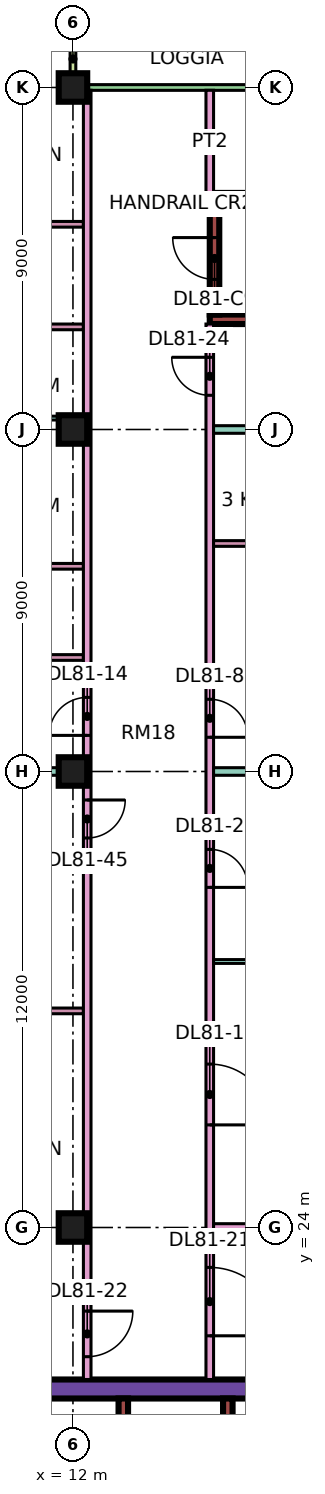
"""IFC4 building model, lengths in metres.
Left out: names, types, materials, properties, quantities, classifications, styles, units other than length and angle.
Written with IfcOpenShell. Run it as: python <this file> out.ifc"""

import sys

from ifc_helpers import new_model, si_unit, direction, frame, frame_2d, origin, origin_2d, place, context, subcontext, project, spatial, rectangle, extrude, element, fill, save


model = new_model("IFC4")
c1 = context("Model", 3, precision=1e-05, world=origin(), true_north=direction((0.0, 1.0)))
c2 = subcontext(c1, "Body", "Model", "MODEL_VIEW")
j1 = project(units=[si_unit("LENGTHUNIT", "METRE"), si_unit("PLANEANGLEUNIT", "RADIAN")], contexts=[c1])
p1 = place(None, origin())
s1 = spatial("IfcSite", under=j1, at=p1, CompositionType="ELEMENT")
p2 = place(p1, origin())
s2 = spatial("IfcBuilding", under=s1, at=p2, CompositionType="ELEMENT")
p3 = place(p2, frame((0.0, 0.0, 350.15)))
s3 = spatial("IfcBuildingStorey", under=s2, at=p3, CompositionType="ELEMENT", Elevation=350.15)
for number, where, z_axis, x_axis in (
    (1, (12.0, 24.0, 0.0), (0.0, 0.0, 1.0), (1.0, 0.0, 0.0)),
    (2, (12.0, 36.0, 0.0), (0.0, 0.0, 1.0), (1.0, 0.0, 0.0)),
    (3, (12.0, 45.0, 0.0), (0.0, 0.0, 1.0), (1.0, 0.0, 0.0)),
    (4, (12.0, 54.0, 0.0), (0.0, 0.0, 1.0), (1.0, 0.0, 0.0)),
):
    element("IfcColumn", number, at=place(p3, frame(where, z_axis=z_axis, x_axis=x_axis)), inside=s3, PredefinedType="COLUMN", context=c2, shape_type="SweptSolid", body=[
        extrude(rectangle(XDim=0.75, YDim=0.75, at=origin_2d()), origin(), (0.0, 0.0, 1.0), 3.75),
    ])
p4 = place(p3, frame((9.0, 19.75, 0.0), z_axis=(0.0, 0.0, 1.0), x_axis=(1.0, 0.0, 0.0)))
e5 = element("IfcWall", 5, at=p4, inside=s3, PredefinedType="SHEAR", context=c2, shape_type="SweptSolid", body=[
    extrude(rectangle(XDim=25.0, YDim=0.5, at=frame_2d((12.5, 0.0))), origin(), (0.0, 0.0, 1.0), 3.75),
])
p5 = place(p4, frame((19.1, 0.0, 0.0)))
e6 = element("IfcOpeningElement", 6, at=p5, cuts=e5, PredefinedType="OPENING", context=c2, shape_type="SweptSolid", body=[
    extrude(rectangle(XDim=1.8, YDim=2.4, at=frame_2d((0.9, 1.2))), frame((0.0, 0.26, 0.0), z_axis=(0.0, -1.0, 0.0), x_axis=(1.0, 0.0, 0.0)), (0.0, 0.0, 1.0), 0.52),
])
p6 = place(p3, frame((13.325, 7.5, 0.0), z_axis=(0.0, 0.0, 1.0), x_axis=(0.0, 1.0, 0.0)))
e7 = element("IfcWall", 7, at=p6, inside=s3, PredefinedType="SHEAR", context=c2, shape_type="SweptSolid", body=[
    extrude(rectangle(XDim=12.0, YDim=0.25, at=frame_2d((6.0, 0.0))), origin(), (0.0, 0.0, 1.0), 3.75),
])
p7 = place(p3, frame((16.075, 15.8, 0.0), z_axis=(0.0, 0.0, 1.0), x_axis=(0.0, 1.0, 0.0)))
e8 = element("IfcWall", 8, at=p7, inside=s3, PredefinedType="SHEAR", context=c2, shape_type="SweptSolid", body=[
    extrude(rectangle(XDim=3.7, YDim=0.25, at=frame_2d((1.85, 0.0))), origin(), (0.0, 0.0, 1.0), 3.75),
])
for number, where, z_axis, x_axis in (
    (9, (15.6, 47.9, 0.0), (0.0, 0.0, 1.0), (1.0, 0.0, 0.0)),
    (10, (15.6, 51.1, 0.0), (0.0, 0.0, 1.0), (1.0, 0.0, 0.0)),
):
    element("IfcWall", number, at=place(p3, frame(where, z_axis=z_axis, x_axis=x_axis)), inside=s3, PredefinedType="SHEAR", context=c2, shape_type="SweptSolid", body=[
        extrude(rectangle(XDim=7.0, YDim=0.25, at=frame_2d((3.5, 0.0))), origin(), (0.0, 0.0, 1.0), 3.75),
    ])
p8 = place(p3, frame((15.725, 48.025, 0.0), z_axis=(0.0, 0.0, 1.0), x_axis=(0.0, 1.0, 0.0)))
e11 = element("IfcWall", 11, at=p8, inside=s3, PredefinedType="SHEAR", context=c2, shape_type="SweptSolid", body=[
    extrude(rectangle(XDim=2.95, YDim=0.25, at=frame_2d((1.475, 0.0))), origin(), (0.0, 0.0, 1.0), 3.75),
])
p9 = place(p8, frame((0.925, 0.0, 0.0)))
e12 = element("IfcOpeningElement", 12, at=p9, cuts=e11, PredefinedType="OPENING", context=c2, shape_type="SweptSolid", body=[
    extrude(rectangle(XDim=1.1, YDim=2.2, at=frame_2d((0.55, 1.1))), frame((0.0, 0.135, 0.0), z_axis=(0.0, -1.0, 0.0), x_axis=(1.0, 0.0, 0.0)), (0.0, 0.0, 1.0), 0.27),
])
p10 = place(p3, frame((22.425, 54.0, 0.0), z_axis=(0.0, 0.0, 1.0), x_axis=(-1.0, 0.0, 0.0)))
e13 = element("IfcWall", 13, at=p10, inside=s3, PredefinedType="SOLIDWALL", context=c2, shape_type="SweptSolid", body=[
    extrude(rectangle(XDim=10.35, YDim=0.15, at=frame_2d((5.175, 0.0))), origin(), (0.0, 0.0, 1.0), 3.35),
])
p11 = place(p10, frame((1.012, 0.0, 0.45)))
e14 = element("IfcOpeningElement", 14, at=p11, cuts=e13, PredefinedType="OPENING", context=c2, shape_type="SweptSolid", body=[
    extrude(rectangle(XDim=4.8, YDim=2.4, at=frame_2d((2.4, 1.2))), frame((0.0, 0.085, 0.0), z_axis=(0.0, -1.0, 0.0), x_axis=(1.0, 0.0, 0.0)), (0.0, 0.0, 1.0), 0.17),
])
p12 = place(p3, frame((12.0, 55.5, 0.0), z_axis=(0.0, 0.0, 1.0), x_axis=(0.0, -1.0, 0.0)))
e15 = element("IfcWall", 15, at=p12, inside=s3, PredefinedType="SOLIDWALL", context=c2, shape_type="SweptSolid", body=[
    extrude(rectangle(XDim=1.5, YDim=0.15, at=frame_2d((0.75, 0.0))), origin(), (0.0, 0.0, 1.0), 3.35),
])
p13 = place(p3, frame((0.0, 36.0, 0.0), z_axis=(0.0, 0.0, 1.0), x_axis=(1.0, 0.0, 0.0)))
e16 = element("IfcWall", 16, at=p13, inside=s3, PredefinedType="PARTITIONING", context=c2, shape_type="SweptSolid", body=[
    extrude(rectangle(XDim=12.275, YDim=0.2, at=frame_2d((6.137, 0.0))), origin(), (0.0, 0.0, 1.0), 3.35),
])
p14 = place(p3, frame((0.074, 22.4, 0.0), z_axis=(0.0, 0.0, 1.0), x_axis=(1.0, 0.0, 0.0)))
e17 = element("IfcWall", 17, at=p14, inside=s3, PredefinedType="PARTITIONING", context=c2, shape_type="SweptSolid", body=[
    extrude(rectangle(XDim=12.201, YDim=0.2, at=frame_2d((6.101, 0.0))), origin(), (0.0, 0.0, 1.0), 3.35),
])
p15 = place(p3, frame((7.05, 29.7, 0.0), z_axis=(0.0, 0.0, 1.0), x_axis=(1.0, 0.0, 0.0)))
e18 = element("IfcWall", 18, at=p15, inside=s3, PredefinedType="PARTITIONING", context=c2, shape_type="SweptSolid", body=[
    extrude(rectangle(XDim=5.225, YDim=0.15, at=frame_2d((2.612, 0.0))), origin(), (0.0, 0.0, 1.0), 3.35),
])
p16 = place(p3, frame((7.05, 33.6, 0.0), z_axis=(0.0, 0.0, 1.0), x_axis=(1.0, 0.0, 0.0)))
e19 = element("IfcWall", 19, at=p16, inside=s3, PredefinedType="PARTITIONING", context=c2, shape_type="SweptSolid", body=[
    extrude(rectangle(XDim=5.225, YDim=0.15, at=frame_2d((2.612, 0.0))), origin(), (0.0, 0.0, 1.0), 3.35),
])
p17 = place(p16, frame((2.175, 0.0, 0.0)))
e20 = element("IfcOpeningElement", 20, at=p17, cuts=e19, PredefinedType="OPENING", context=c2, shape_type="SweptSolid", body=[
    extrude(rectangle(XDim=0.8, YDim=2.1, at=frame_2d((0.4, 1.05))), frame((0.0, 0.085, 0.0), z_axis=(0.0, -1.0, 0.0), x_axis=(1.0, 0.0, 0.0)), (0.0, 0.0, 1.0), 0.17),
])
for number, where, z_axis, x_axis in (
    (21, (7.05, 39.0, 0.0), (0.0, 0.0, 1.0), (1.0, 0.0, 0.0)),
    (22, (7.05, 41.4, 0.0), (0.0, 0.0, 1.0), (1.0, 0.0, 0.0)),
):
    element("IfcWall", number, at=place(p3, frame(where, z_axis=z_axis, x_axis=x_axis)), inside=s3, PredefinedType="PARTITIONING", context=c2, shape_type="SweptSolid", body=[
        extrude(rectangle(XDim=5.225, YDim=0.15, at=frame_2d((2.612, 0.0))), origin(), (0.0, 0.0, 1.0), 3.35),
    ])
p18 = place(p3, frame((7.05, 45.3, 0.0), z_axis=(0.0, 0.0, 1.0), x_axis=(1.0, 0.0, 0.0)))
e23 = element("IfcWall", 23, at=p18, inside=s3, PredefinedType="PARTITIONING", context=c2, shape_type="SweptSolid", body=[
    extrude(rectangle(XDim=5.225, YDim=0.1, at=frame_2d((2.612, 0.0))), origin(), (0.0, 0.0, 1.0), 3.35),
])
for number, where, z_axis, x_axis in (
    (24, (7.05, 47.7, 0.0), (0.0, 0.0, 1.0), (1.0, 0.0, 0.0)),
    (25, (7.05, 50.4, 0.0), (0.0, 0.0, 1.0), (1.0, 0.0, 0.0)),
):
    element("IfcWall", number, at=place(p3, frame(where, z_axis=z_axis, x_axis=x_axis)), inside=s3, PredefinedType="PARTITIONING", context=c2, shape_type="SweptSolid", body=[
        extrude(rectangle(XDim=5.225, YDim=0.15, at=frame_2d((2.612, 0.0))), origin(), (0.0, 0.0, 1.0), 3.35),
    ])
p19 = place(p3, frame((12.375, 20.0, 0.0), z_axis=(0.0, 0.0, 1.0), x_axis=(0.0, 1.0, 0.0)))
e26 = element("IfcWall", 26, at=p19, inside=s3, PredefinedType="PARTITIONING", context=c2, shape_type="SweptSolid", body=[
    extrude(rectangle(XDim=33.926, YDim=0.2, at=frame_2d((16.963, 0.0))), origin(), (0.0, 0.0, 1.0), 3.35),
])
p20 = place(p19, frame((16.95, 0.0, 0.0)))
e27 = element("IfcOpeningElement", 27, at=p20, cuts=e26, PredefinedType="OPENING", context=c2, shape_type="SweptSolid", body=[
    extrude(rectangle(XDim=1.0, YDim=2.1, at=frame_2d((0.5, 1.05))), frame((0.0, 0.11, 0.0), z_axis=(0.0, -1.0, 0.0), x_axis=(1.0, 0.0, 0.0)), (0.0, 0.0, 1.0), 0.22),
])
p21 = place(p19, frame((0.6, 0.0, 0.0)))
e28 = element("IfcOpeningElement", 28, at=p21, cuts=e26, PredefinedType="OPENING", context=c2, shape_type="SweptSolid", body=[
    extrude(rectangle(XDim=1.2, YDim=2.1, at=frame_2d((0.6, 1.05))), frame((0.0, 0.11, 0.0), z_axis=(0.0, -1.0, 0.0), x_axis=(1.0, 0.0, 0.0)), (0.0, 0.0, 1.0), 0.22),
])
p22 = place(p19, frame((14.25, 0.0, 0.0)))
e29 = element("IfcOpeningElement", 29, at=p22, cuts=e26, PredefinedType="OPENING", context=c2, shape_type="SweptSolid", body=[
    extrude(rectangle(XDim=1.0, YDim=2.1, at=frame_2d((0.5, 1.05))), frame((0.0, 0.11, 0.0), z_axis=(0.0, -1.0, 0.0), x_axis=(1.0, 0.0, 0.0)), (0.0, 0.0, 1.0), 0.22),
])
p23 = place(p3, frame((15.6, 20.0, 0.0), z_axis=(0.0, 0.0, 1.0), x_axis=(0.0, 1.0, 0.0)))
e30 = element("IfcWall", 30, at=p23, inside=s3, PredefinedType="PARTITIONING", context=c2, shape_type="SweptSolid", body=[
    extrude(rectangle(XDim=27.775, YDim=0.2, at=frame_2d((13.887, 0.0))), origin(), (0.0, 0.0, 1.0), 3.35),
])
p24 = place(p23, frame((6.7, 0.0, 0.0)))
e31 = element("IfcOpeningElement", 31, at=p24, cuts=e30, PredefinedType="OPENING", context=c2, shape_type="SweptSolid", body=[
    extrude(rectangle(XDim=1.6, YDim=2.1, at=frame_2d((0.8, 1.05))), frame((0.0, 0.11, 0.0), z_axis=(0.0, -1.0, 0.0), x_axis=(1.0, 0.0, 0.0)), (0.0, 0.0, 1.0), 0.22),
])
p25 = place(p23, frame((12.95, 0.0, 0.0)))
e32 = element("IfcOpeningElement", 32, at=p25, cuts=e30, PredefinedType="OPENING", context=c2, shape_type="SweptSolid", body=[
    extrude(rectangle(XDim=1.0, YDim=2.1, at=frame_2d((0.5, 1.05))), frame((0.0, 0.11, 0.0), z_axis=(0.0, -1.0, 0.0), x_axis=(1.0, 0.0, 0.0)), (0.0, 0.0, 1.0), 0.22),
])
p26 = place(p23, frame((16.9, 0.0, 0.0)))
e33 = element("IfcOpeningElement", 33, at=p26, cuts=e30, PredefinedType="OPENING", context=c2, shape_type="SweptSolid", body=[
    extrude(rectangle(XDim=1.0, YDim=2.1, at=frame_2d((0.5, 1.05))), frame((0.0, 0.11, 0.0), z_axis=(0.0, -1.0, 0.0), x_axis=(1.0, 0.0, 0.0)), (0.0, 0.0, 1.0), 0.22),
])
p27 = place(p23, frame((1.15, 0.0, 0.0)))
e34 = element("IfcOpeningElement", 34, at=p27, cuts=e30, PredefinedType="OPENING", context=c2, shape_type="SweptSolid", body=[
    extrude(rectangle(XDim=1.8, YDim=2.1, at=frame_2d((0.9, 1.05))), frame((0.0, 0.11, 0.0), z_axis=(0.0, -1.0, 0.0), x_axis=(1.0, 0.0, 0.0)), (0.0, 0.0, 1.0), 0.22),
])
p28 = place(p23, frame((25.9, 0.0, 0.0)))
e35 = element("IfcOpeningElement", 35, at=p28, cuts=e30, PredefinedType="OPENING", context=c2, shape_type="SweptSolid", body=[
    extrude(rectangle(XDim=1.0, YDim=2.1, at=frame_2d((0.5, 1.05))), frame((0.0, 0.11, 0.0), z_axis=(0.0, -1.0, 0.0), x_axis=(1.0, 0.0, 0.0)), (0.0, 0.0, 1.0), 0.22),
])
p29 = place(p3, frame((15.6, 51.225, 0.0), z_axis=(0.0, 0.0, 1.0), x_axis=(0.0, 1.0, 0.0)))
e36 = element("IfcWall", 36, at=p29, inside=s3, PredefinedType="PARTITIONING", context=c2, shape_type="SweptSolid", body=[
    extrude(rectangle(XDim=2.701, YDim=0.2, at=frame_2d((1.351, 0.0))), origin(), (0.0, 0.0, 1.0), 3.35),
])
p30 = place(p3, frame((15.7, 24.0, 0.0), z_axis=(0.0, 0.0, 1.0), x_axis=(1.0, 0.0, 0.0)))
e37 = element("IfcWall", 37, at=p30, inside=s3, PredefinedType="PARTITIONING", context=c2, shape_type="SweptSolid", body=[
    extrude(rectangle(XDim=5.8, YDim=0.2, at=frame_2d((2.9, 0.0))), origin(), (0.0, 0.0, 1.0), 3.35),
])
p31 = place(p3, frame((15.7, 31.0, 0.0), z_axis=(0.0, 0.0, 1.0), x_axis=(1.0, 0.0, 0.0)))
e38 = element("IfcWall", 38, at=p31, inside=s3, PredefinedType="PARTITIONING", context=c2, shape_type="SweptSolid", body=[
    extrude(rectangle(XDim=5.8, YDim=0.1, at=frame_2d((2.9, 0.0))), origin(), (0.0, 0.0, 1.0), 3.35),
])
p32 = place(p3, frame((15.7, 36.0, 0.0), z_axis=(0.0, 0.0, 1.0), x_axis=(1.0, 0.0, 0.0)))
e39 = element("IfcWall", 39, at=p32, inside=s3, PredefinedType="PARTITIONING", context=c2, shape_type="SweptSolid", body=[
    extrude(rectangle(XDim=8.3, YDim=0.2, at=frame_2d((4.15, 0.0))), origin(), (0.0, 0.0, 1.0), 3.35),
])
for number, where, z_axis, x_axis in (
    (40, (15.7, 38.7, 0.0), (0.0, 0.0, 1.0), (1.0, 0.0, 0.0)),
    (41, (15.7, 42.0, 0.0), (0.0, 0.0, 1.0), (1.0, 0.0, 0.0)),
):
    element("IfcWall", number, at=place(p3, frame(where, z_axis=z_axis, x_axis=x_axis)), inside=s3, PredefinedType="PARTITIONING", context=c2, shape_type="SweptSolid", body=[
        extrude(rectangle(XDim=3.125, YDim=0.15, at=frame_2d((1.562, 0.0))), origin(), (0.0, 0.0, 1.0), 3.35),
    ])
p33 = place(p3, frame((15.7, 45.0, 0.0), z_axis=(0.0, 0.0, 1.0), x_axis=(1.0, 0.0, 0.0)))
e42 = element("IfcWall", 42, at=p33, inside=s3, PredefinedType="PARTITIONING", context=c2, shape_type="SweptSolid", body=[
    extrude(rectangle(XDim=8.226, YDim=0.2, at=frame_2d((4.113, 0.0))), origin(), (0.0, 0.0, 1.0), 3.35),
])
p34 = place(p9, frame((1.1, 0.0, 0.0), z_axis=(0.0, 0.0, 1.0), x_axis=(-1.0, 0.0, 0.0)))
e43 = element("IfcDoor", 43, at=p34, inside=s3, OperationType="SINGLE_SWING_RIGHT", PredefinedType="DOOR", context=c2, shape_type="SweptSolid", body=[
    extrude(rectangle(XDim=1.1, YDim=2.2, at=frame_2d((0.55, 1.1))), frame((0.0, 0.025, 0.0), z_axis=(0.0, -1.0, 0.0), x_axis=(1.0, 0.0, 0.0)), (0.0, 0.0, 1.0), 0.05),
])
fill(e12, e43)
p35 = place(p24, frame((1.6, 0.0, 0.0), z_axis=(0.0, 0.0, 1.0), x_axis=(-1.0, 0.0, 0.0)))
e44 = element("IfcDoor", 44, at=p35, inside=s3, OperationType="DOUBLE_DOOR_SINGLE_SWING", PredefinedType="DOOR", context=c2, shape_type="SweptSolid", body=[
    extrude(rectangle(XDim=1.6, YDim=2.1, at=frame_2d((0.8, 1.05))), frame((0.0, 0.025, 0.0), z_axis=(0.0, -1.0, 0.0), x_axis=(1.0, 0.0, 0.0)), (0.0, 0.0, 1.0), 0.05),
])
fill(e31, e44)
p36 = place(p25, frame((1.0, 0.0, 0.0), z_axis=(0.0, 0.0, 1.0), x_axis=(-1.0, 0.0, 0.0)))
e45 = element("IfcDoor", 45, at=p36, inside=s3, OperationType="SINGLE_SWING_LEFT", PredefinedType="DOOR", context=c2, shape_type="SweptSolid", body=[
    extrude(rectangle(XDim=1.0, YDim=2.1, at=frame_2d((0.5, 1.05))), frame((0.0, 0.025, 0.0), z_axis=(0.0, -1.0, 0.0), x_axis=(1.0, 0.0, 0.0)), (0.0, 0.0, 1.0), 0.05),
])
fill(e32, e45)
p37 = place(p26, frame((1.0, 0.0, 0.0), z_axis=(0.0, 0.0, 1.0), x_axis=(-1.0, 0.0, 0.0)))
e46 = element("IfcDoor", 46, at=p37, inside=s3, OperationType="SINGLE_SWING_LEFT", PredefinedType="DOOR", context=c2, shape_type="SweptSolid", body=[
    extrude(rectangle(XDim=1.0, YDim=2.1, at=frame_2d((0.5, 1.05))), frame((0.0, 0.025, 0.0), z_axis=(0.0, -1.0, 0.0), x_axis=(1.0, 0.0, 0.0)), (0.0, 0.0, 1.0), 0.05),
])
fill(e33, e46)
p38 = place(p20, origin())
e47 = element("IfcDoor", 47, at=p38, inside=s3, OperationType="SINGLE_SWING_LEFT", PredefinedType="DOOR", context=c2, shape_type="SweptSolid", body=[
    extrude(rectangle(XDim=1.0, YDim=2.1, at=frame_2d((0.5, 1.05))), frame((0.0, 0.025, 0.0), z_axis=(0.0, -1.0, 0.0), x_axis=(1.0, 0.0, 0.0)), (0.0, 0.0, 1.0), 0.05),
])
fill(e27, e47)
p39 = place(p27, frame((1.8, 0.0, 0.0), z_axis=(0.0, 0.0, 1.0), x_axis=(-1.0, 0.0, 0.0)))
e48 = element("IfcDoor", 48, at=p39, inside=s3, OperationType="DOUBLE_DOOR_SINGLE_SWING", PredefinedType="DOOR", context=c2, shape_type="SweptSolid", body=[
    extrude(rectangle(XDim=1.8, YDim=2.1, at=frame_2d((0.9, 1.05))), frame((0.0, 0.025, 0.0), z_axis=(0.0, -1.0, 0.0), x_axis=(1.0, 0.0, 0.0)), (0.0, 0.0, 1.0), 0.05),
])
fill(e34, e48)
p40 = place(p21, origin())
e49 = element("IfcDoor", 49, at=p40, inside=s3, OperationType="SINGLE_SWING_RIGHT", PredefinedType="DOOR", context=c2, shape_type="SweptSolid", body=[
    extrude(rectangle(XDim=1.2, YDim=2.1, at=frame_2d((0.6, 1.05))), frame((0.0, 0.025, 0.0), z_axis=(0.0, -1.0, 0.0), x_axis=(1.0, 0.0, 0.0)), (0.0, 0.0, 1.0), 0.05),
])
fill(e28, e49)
p41 = place(p28, frame((1.0, 0.0, 0.0), z_axis=(0.0, 0.0, 1.0), x_axis=(-1.0, 0.0, 0.0)))
e50 = element("IfcDoor", 50, at=p41, inside=s3, OperationType="SINGLE_SWING_RIGHT", PredefinedType="DOOR", context=c2, shape_type="SweptSolid", body=[
    extrude(rectangle(XDim=1.0, YDim=2.1, at=frame_2d((0.5, 1.05))), frame((0.0, 0.025, 0.0), z_axis=(0.0, -1.0, 0.0), x_axis=(1.0, 0.0, 0.0)), (0.0, 0.0, 1.0), 0.05),
])
fill(e35, e50)
p42 = place(p22, origin())
e51 = element("IfcDoor", 51, at=p42, inside=s3, OperationType="SINGLE_SWING_RIGHT", PredefinedType="DOOR", context=c2, shape_type="SweptSolid", body=[
    extrude(rectangle(XDim=1.0, YDim=2.1, at=frame_2d((0.5, 1.05))), frame((0.0, 0.025, 0.0), z_axis=(0.0, -1.0, 0.0), x_axis=(1.0, 0.0, 0.0)), (0.0, 0.0, 1.0), 0.05),
])
fill(e29, e51)
save(model, sys.argv[1])
